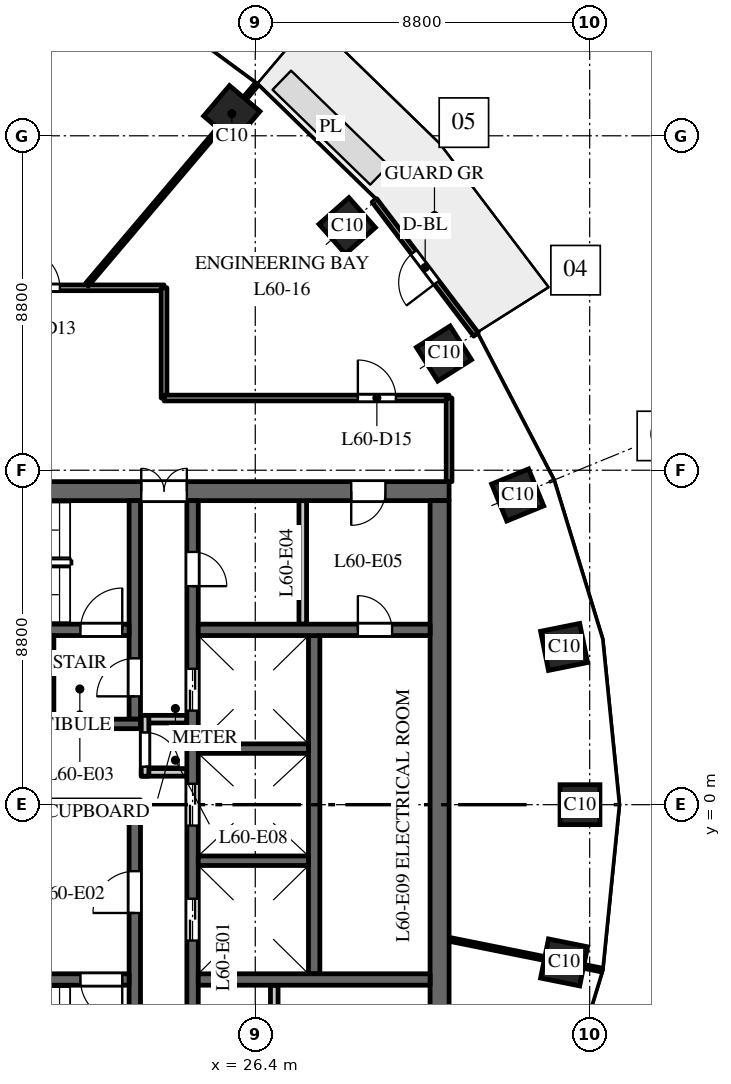
"""IFC4 building model, lengths in metres.
Left out: names, types, materials, properties, quantities, classifications, styles, units other than length and angle.
Written with IfcOpenShell. Run it as: python <this file> out.ifc"""

import sys

from ifc_helpers import new_model, si_unit, direction, frame, frame_2d, origin, origin_2d, place, context, subcontext, project, spatial, rectangle, extrude, element, fill, save


model = new_model("IFC4")
c1 = context("Model", 3, precision=1e-05, world=origin(), true_north=direction((0.0, 1.0)))
c2 = subcontext(c1, "Body", "Model", "MODEL_VIEW")
j1 = project(units=[si_unit("LENGTHUNIT", "METRE"), si_unit("PLANEANGLEUNIT", "RADIAN")], contexts=[c1])
p1 = place(None, origin())
s1 = spatial("IfcSite", under=j1, at=p1, CompositionType="ELEMENT")
p2 = place(p1, origin())
s2 = spatial("IfcBuilding", under=s1, at=p2, CompositionType="ELEMENT")
p3 = place(p2, frame((0.0, 0.0, 281.5)))
s3 = spatial("IfcBuildingStorey", under=s2, at=p3, CompositionType="ELEMENT", Elevation=281.5)
for number, where, z_axis, x_axis in (
    (1, (34.945, 0.0, 0.0), (0.0, 0.0, 1.0), (0.0, 1.0, 0.0)),
    (2, (34.527, 4.151, 0.0), (0.0, 0.0, 1.0), (-0.197, 0.98, 0.0)),
    (3, (33.305, 8.149, 0.0), (0.0, 0.0, 1.0), (-0.379, 0.925, 0.0)),
    (4, (31.365, 11.871, 0.0), (0.0, 0.0, 1.0), (-0.535, 0.845, 0.0)),
    (5, (28.819, 15.23, 0.0), (0.0, 0.0, 1.0), (-0.663, 0.749, 0.0)),
    (6, (25.783, 18.18, 0.0), (0.0, 0.0, 1.0), (-0.763, 0.646, 0.0)),
    (7, (34.527, -4.151, 0.0), (0.0, 0.0, 1.0), (0.197, 0.98, 0.0)),
):
    element("IfcColumn", number, at=place(p3, frame(where, z_axis=z_axis, x_axis=x_axis)), inside=s3, PredefinedType="COLUMN", context=c2, shape_type="SweptSolid", body=[
        extrude(rectangle(XDim=1.05, YDim=1.05, at=origin_2d()), origin(), (0.0, 0.0, 1.0), 4.0),
    ])
p4 = place(p3, frame((16.5, 8.25, 0.0), z_axis=(0.0, 0.0, 1.0), x_axis=(1.0, 0.0, 0.0)))
e8 = element("IfcWall", 8, at=p4, inside=s3, PredefinedType="SHEAR", context=c2, shape_type="SweptSolid", body=[
    extrude(rectangle(XDim=15.0, YDim=0.5, at=frame_2d((7.5, 0.0))), origin(), (0.0, 0.0, 1.0), 3.7),
])
p5 = place(p4, frame((6.9, 0.0, 0.0)))
e9 = element("IfcOpeningElement", 9, at=p5, cuts=e8, PredefinedType="OPENING", context=c2, shape_type="SweptSolid", body=[
    extrude(rectangle(XDim=1.2, YDim=2.1, at=frame_2d((0.6, 1.05))), frame((0.0, 0.26, 0.0), z_axis=(0.0, -1.0, 0.0), x_axis=(1.0, 0.0, 0.0)), (0.0, 0.0, 1.0), 0.52),
])
p6 = place(p4, frame((12.425, 0.0, 0.0)))
e10 = element("IfcOpeningElement", 10, at=p6, cuts=e8, PredefinedType="OPENING", context=c2, shape_type="SweptSolid", body=[
    extrude(rectangle(XDim=0.9, YDim=2.1, at=frame_2d((0.45, 1.05))), frame((0.0, 0.26, 0.0), z_axis=(0.0, -1.0, 0.0), x_axis=(1.0, 0.0, 0.0)), (0.0, 0.0, 1.0), 0.52),
])
p7 = place(p3, frame((27.95, -4.45, 0.0), z_axis=(0.0, 0.0, 1.0), x_axis=(0.0, 1.0, 0.0)))
e11 = element("IfcWall", 11, at=p7, inside=s3, PredefinedType="SHEAR", context=c2, shape_type="SweptSolid", body=[
    extrude(rectangle(XDim=8.9, YDim=0.3, at=frame_2d((4.45, 0.0))), origin(), (0.0, 0.0, 1.0), 3.7),
])
p8 = place(p3, frame((24.75, -8.0, 0.0), z_axis=(0.0, 0.0, 1.0), x_axis=(0.0, 1.0, 0.0)))
e12 = element("IfcWall", 12, at=p8, inside=s3, PredefinedType="SHEAR", context=c2, shape_type="SweptSolid", body=[
    extrude(rectangle(XDim=16.0, YDim=0.3, at=frame_2d((8.0, 0.0))), origin(), (0.0, 0.0, 1.0), 3.7),
])
p9 = place(p8, frame((4.425, 0.0, 0.0)))
e13 = element("IfcOpeningElement", 13, at=p9, cuts=e12, PredefinedType="OPENING", context=c2, shape_type="SweptSolid", body=[
    extrude(rectangle(XDim=1.1, YDim=2.1, at=frame_2d((0.55, 1.05))), frame((0.0, 0.16, 0.0), z_axis=(0.0, -1.0, 0.0), x_axis=(1.0, 0.0, 0.0)), (0.0, 0.0, 1.0), 0.32),
])
p10 = place(p8, frame((7.45, 0.0, 0.0)))
e14 = element("IfcOpeningElement", 14, at=p10, cuts=e12, PredefinedType="OPENING", context=c2, shape_type="SweptSolid", body=[
    extrude(rectangle(XDim=1.1, YDim=2.1, at=frame_2d((0.55, 1.05))), frame((0.0, 0.16, 0.0), z_axis=(0.0, -1.0, 0.0), x_axis=(1.0, 0.0, 0.0)), (0.0, 0.0, 1.0), 0.32),
])
p11 = place(p8, frame((10.475, 0.0, 0.0)))
e15 = element("IfcOpeningElement", 15, at=p11, cuts=e12, PredefinedType="OPENING", context=c2, shape_type="SweptSolid", body=[
    extrude(rectangle(XDim=1.1, YDim=2.1, at=frame_2d((0.55, 1.05))), frame((0.0, 0.16, 0.0), z_axis=(0.0, -1.0, 0.0), x_axis=(1.0, 0.0, 0.0)), (0.0, 0.0, 1.0), 0.32),
])
p12 = place(p8, frame((13.75, 0.0, 0.0)))
e16 = element("IfcOpeningElement", 16, at=p12, cuts=e12, PredefinedType="OPENING", context=c2, shape_type="SweptSolid", body=[
    extrude(rectangle(XDim=0.9, YDim=2.1, at=frame_2d((0.45, 1.05))), frame((0.0, 0.16, 0.0), z_axis=(0.0, -1.0, 0.0), x_axis=(1.0, 0.0, 0.0)), (0.0, 0.0, 1.0), 0.32),
])
p13 = place(p8, frame((1.35, 0.0, 0.0)))
e17 = element("IfcOpeningElement", 17, at=p13, cuts=e12, PredefinedType="OPENING", context=c2, shape_type="SweptSolid", body=[
    extrude(rectangle(XDim=0.9, YDim=2.1, at=frame_2d((0.45, 1.05))), frame((0.0, 0.16, 0.0), z_axis=(0.0, -1.0, 0.0), x_axis=(1.0, 0.0, 0.0)), (0.0, 0.0, 1.0), 0.32),
])
p14 = place(p3, frame((20.1, 0.0, 0.0), z_axis=(0.0, 0.0, 1.0), x_axis=(1.0, 0.0, 0.0)))
e18 = element("IfcWall", 18, at=p14, inside=s3, PredefinedType="SHEAR", context=c2, shape_type="SweptSolid", body=[
    extrude(rectangle(XDim=3.28, YDim=0.25, at=frame_2d((1.64, 0.0))), origin(), (0.0, 0.0, 1.0), 3.7),
])
for number, where, z_axis, x_axis in (
    (19, (23.4, 0.85, 0.0), (0.0, 0.0, 1.0), (1.0, 0.0, 0.0)),
    (20, (23.4, 2.25, 0.0), (0.0, 0.0, 1.0), (1.0, 0.0, 0.0)),
):
    element("IfcWall", number, at=place(p3, frame(where, z_axis=z_axis, x_axis=x_axis)), inside=s3, PredefinedType="PARTITIONING", context=c2, shape_type="SweptSolid", body=[
        extrude(rectangle(XDim=1.2, YDim=0.2, at=frame_2d((0.6, 0.0))), origin(), (0.0, 0.0, 1.0), 3.7),
    ])
p15 = place(p3, frame((23.5, 0.75, 0.0), z_axis=(0.0, 0.0, 1.0), x_axis=(0.0, 1.0, 0.0)))
e21 = element("IfcWall", 21, at=p15, inside=s3, PredefinedType="PARTITIONING", context=c2, shape_type="SweptSolid", body=[
    extrude(rectangle(XDim=1.6, YDim=0.2, at=frame_2d((0.8, 0.0))), origin(), (0.0, 0.0, 1.0), 3.7),
])
p16 = place(p15, frame((0.25, 0.0, 0.0)))
e22 = element("IfcOpeningElement", 22, at=p16, cuts=e21, PredefinedType="OPENING", context=c2, shape_type="SweptSolid", body=[
    extrude(rectangle(XDim=0.9, YDim=2.1, at=frame_2d((0.45, 1.05))), frame((0.0, 0.11, 0.0), z_axis=(0.0, -1.0, 0.0), x_axis=(1.0, 0.0, 0.0)), (0.0, 0.0, 1.0), 0.22),
])
p17 = place(p3, frame((31.25, -8.0, 0.0), z_axis=(0.0, 0.0, 1.0), x_axis=(0.0, 1.0, 0.0)))
e23 = element("IfcWall", 23, at=p17, inside=s3, PredefinedType="SHEAR", context=c2, shape_type="SweptSolid", body=[
    extrude(rectangle(XDim=16.0, YDim=0.5, at=frame_2d((8.0, 0.0))), origin(), (0.0, 0.0, 1.0), 3.7),
])
p18 = place(p3, frame((24.9, 4.6, 0.0), z_axis=(0.0, 0.0, 1.0), x_axis=(1.0, 0.0, 0.0)))
e24 = element("IfcWall", 24, at=p18, inside=s3, PredefinedType="SHEAR", context=c2, shape_type="SweptSolid", body=[
    extrude(rectangle(XDim=6.1, YDim=0.3, at=frame_2d((3.05, 0.0))), origin(), (0.0, 0.0, 1.0), 3.7),
])
p19 = place(p18, frame((4.2, 0.0, 0.0)))
e25 = element("IfcOpeningElement", 25, at=p19, cuts=e24, PredefinedType="OPENING", context=c2, shape_type="SweptSolid", body=[
    extrude(rectangle(XDim=0.9, YDim=2.1, at=frame_2d((0.45, 1.05))), frame((0.0, 0.16, 0.0), z_axis=(0.0, -1.0, 0.0), x_axis=(1.0, 0.0, 0.0)), (0.0, 0.0, 1.0), 0.32),
])
for number, where, z_axis, x_axis in (
    (26, (27.65, 4.75, 0.0), (0.0, 0.0, 1.0), (0.0, 1.0, 0.0)),
    (27, (26.9, -8.0, 0.0), (0.0, 0.0, 1.0), (0.0, 1.0, 0.0)),
):
    element("IfcWall", number, at=place(p3, frame(where, z_axis=z_axis, x_axis=x_axis)), inside=s3, PredefinedType="PARTITIONING", context=c2, shape_type="SweptSolid", body=[
        extrude(rectangle(XDim=3.25, YDim=0.2, at=frame_2d((1.625, 0.0))), origin(), (0.0, 0.0, 1.0), 3.7),
    ])
p20 = place(p3, frame((24.9, -4.6, 0.0), z_axis=(0.0, 0.0, 1.0), x_axis=(1.0, 0.0, 0.0)))
e28 = element("IfcWall", 28, at=p20, inside=s3, PredefinedType="SHEAR", context=c2, shape_type="SweptSolid", body=[
    extrude(rectangle(XDim=6.1, YDim=0.3, at=frame_2d((3.05, 0.0))), origin(), (0.0, 0.0, 1.0), 3.7),
])
for number, where, z_axis, x_axis in (
    (29, (24.9, -1.475, 0.0), (0.0, 0.0, 1.0), (1.0, 0.0, 0.0)),
    (30, (24.9, 1.475, 0.0), (0.0, 0.0, 1.0), (1.0, 0.0, 0.0)),
):
    element("IfcWall", number, at=place(p3, frame(where, z_axis=z_axis, x_axis=x_axis)), inside=s3, PredefinedType="SHEAR", context=c2, shape_type="SweptSolid", body=[
        extrude(rectangle(XDim=2.9, YDim=0.25, at=frame_2d((1.45, 0.0))), origin(), (0.0, 0.0, 1.0), 3.7),
    ])
p21 = place(p3, frame((23.23, 2.25, 0.0), z_axis=(0.0, 0.0, 1.0), x_axis=(0.0, 1.0, 0.0)))
e31 = element("IfcWall", 31, at=p21, inside=s3, PredefinedType="SHEAR", context=c2, shape_type="SweptSolid", body=[
    extrude(rectangle(XDim=5.75, YDim=0.3, at=frame_2d((2.875, 0.0))), origin(), (0.0, 0.0, 1.0), 3.7),
])
p22 = place(p21, frame((0.6, 0.0, 0.0)))
e32 = element("IfcOpeningElement", 32, at=p22, cuts=e31, PredefinedType="OPENING", context=c2, shape_type="SweptSolid", body=[
    extrude(rectangle(XDim=1.0, YDim=2.1, at=frame_2d((0.5, 1.05))), frame((0.0, 0.16, 0.0), z_axis=(0.0, -1.0, 0.0), x_axis=(1.0, 0.0, 0.0)), (0.0, 0.0, 1.0), 0.32),
])
p23 = place(p3, frame((23.23, -8.0, 0.0), z_axis=(0.0, 0.0, 1.0), x_axis=(0.0, 1.0, 0.0)))
e33 = element("IfcWall", 33, at=p23, inside=s3, PredefinedType="SHEAR", context=c2, shape_type="SweptSolid", body=[
    extrude(rectangle(XDim=7.875, YDim=0.3, at=frame_2d((3.938, 0.0))), origin(), (0.0, 0.0, 1.0), 3.7),
])
p24 = place(p23, frame((5.15, 0.0, 0.0)))
e34 = element("IfcOpeningElement", 34, at=p24, cuts=e33, PredefinedType="OPENING", context=c2, shape_type="SweptSolid", body=[
    extrude(rectangle(XDim=1.1, YDim=2.1, at=frame_2d((0.55, 1.05))), frame((0.0, 0.16, 0.0), z_axis=(0.0, -1.0, 0.0), x_axis=(1.0, 0.0, 0.0)), (0.0, 0.0, 1.0), 0.32),
])
p25 = place(p3, frame((16.9, 4.6, 0.0), z_axis=(0.0, 0.0, 1.0), x_axis=(1.0, 0.0, 0.0)))
e35 = element("IfcWall", 35, at=p25, inside=s3, PredefinedType="SHEAR", context=c2, shape_type="SweptSolid", body=[
    extrude(rectangle(XDim=6.18, YDim=0.3, at=frame_2d((3.09, 0.0))), origin(), (0.0, 0.0, 1.0), 3.7),
])
p26 = place(p25, frame((4.9, 0.0, 0.0)))
e36 = element("IfcOpeningElement", 36, at=p26, cuts=e35, PredefinedType="OPENING", context=c2, shape_type="SweptSolid", body=[
    extrude(rectangle(XDim=1.1, YDim=2.1, at=frame_2d((0.55, 1.05))), frame((0.0, 0.16, 0.0), z_axis=(0.0, -1.0, 0.0), x_axis=(1.0, 0.0, 0.0)), (0.0, 0.0, 1.0), 0.32),
])
p27 = place(p3, frame((16.9, -4.6, 0.0), z_axis=(0.0, 0.0, 1.0), x_axis=(1.0, 0.0, 0.0)))
e37 = element("IfcWall", 37, at=p27, inside=s3, PredefinedType="SHEAR", context=c2, shape_type="SweptSolid", body=[
    extrude(rectangle(XDim=6.18, YDim=0.3, at=frame_2d((3.09, 0.0))), origin(), (0.0, 0.0, 1.0), 3.7),
])
p28 = place(p27, frame((4.9, 0.0, 0.0)))
e38 = element("IfcOpeningElement", 38, at=p28, cuts=e37, PredefinedType="OPENING", context=c2, shape_type="SweptSolid", body=[
    extrude(rectangle(XDim=1.1, YDim=2.1, at=frame_2d((0.55, 1.05))), frame((0.0, 0.16, 0.0), z_axis=(0.0, -1.0, 0.0), x_axis=(1.0, 0.0, 0.0)), (0.0, 0.0, 1.0), 0.32),
])
p29 = place(p3, frame((20.85, 2.125, 0.0), z_axis=(0.0, 0.0, 1.0), x_axis=(1.0, 0.0, 0.0)))
e39 = element("IfcWall", 39, at=p29, inside=s3, PredefinedType="SHEAR", context=c2, shape_type="SweptSolid", body=[
    extrude(rectangle(XDim=2.53, YDim=0.25, at=frame_2d((1.265, 0.0))), origin(), (0.0, 0.0, 1.0), 3.7),
])
p30 = place(p3, frame((20.975, 2.25, 0.0), z_axis=(0.0, 0.0, 1.0), x_axis=(0.0, 1.0, 0.0)))
e40 = element("IfcWall", 40, at=p30, inside=s3, PredefinedType="SHEAR", context=c2, shape_type="SweptSolid", body=[
    extrude(rectangle(XDim=2.2, YDim=0.25, at=frame_2d((1.1, 0.0))), origin(), (0.0, 0.0, 1.0), 3.7),
])
p31 = place(p3, frame((32.208, 12.374, 0.0), z_axis=(0.0, 0.0, 1.0), x_axis=(-0.604045763106, 0.796949632081, 0.0)))
e41 = element("IfcWall", 41, at=p31, inside=s3, PredefinedType="STANDARD", context=c2, shape_type="SweptSolid", body=[
    extrude(rectangle(XDim=4.423, YDim=0.15, at=frame_2d((2.212, 0.0))), origin(), (0.0, 0.0, 1.0), 3.7),
])
p32 = place(p31, frame((1.712, 0.0, 0.0)))
e42 = element("IfcOpeningElement", 42, at=p32, cuts=e41, PredefinedType="OPENING", context=c2, shape_type="SweptSolid", body=[
    extrude(rectangle(XDim=1.0, YDim=2.4, at=frame_2d((0.5, 1.2))), frame((0.0, 0.085, 0.0), z_axis=(0.0, -1.0, 0.0), x_axis=(1.0, 0.0, 0.0)), (0.0, 0.0, 1.0), 0.17),
])
p33 = place(p3, frame((4.566, 13.6, 0.0), z_axis=(0.0, 0.0, 1.0), x_axis=(1.0, 0.0, 0.0)))
e43 = element("IfcWall", 43, at=p33, inside=s3, PredefinedType="PARTITIONING", context=c2, shape_type="SweptSolid", body=[
    extrude(rectangle(XDim=19.434, YDim=0.15, at=frame_2d((9.717, 0.0))), origin(), (0.0, 0.0, 1.0), 2.85),
])
p34 = place(p33, frame((15.692, 0.0, 0.0)))
e44 = element("IfcOpeningElement", 44, at=p34, cuts=e43, PredefinedType="OPENING", context=c2, shape_type="SweptSolid", body=[
    extrude(rectangle(XDim=1.0, YDim=2.1, at=frame_2d((0.5, 1.05))), frame((0.0, 0.085, 0.0), z_axis=(0.0, -1.0, 0.0), x_axis=(1.0, 0.0, 0.0)), (0.0, 0.0, 1.0), 0.17),
])
p35 = place(p3, frame((21.968, 13.678, 0.0), z_axis=(0.0, 0.0, 1.0), x_axis=(0.646376547424, 0.763018583614, 0.0)))
e45 = element("IfcWall", 45, at=p35, inside=s3, PredefinedType="PARTITIONING", context=c2, shape_type="SweptSolid", body=[
    extrude(rectangle(XDim=6.903, YDim=0.1, at=frame_2d((3.452, 0.0))), origin(), (0.0, 0.0, 1.0), 3.0),
])
p36 = place(p3, frame((24.0, 10.7, 0.0), z_axis=(0.0, 0.0, 1.0), x_axis=(0.0, 1.0, 0.0)))
e46 = element("IfcWall", 46, at=p36, inside=s3, PredefinedType="PARTITIONING", context=c2, shape_type="SweptSolid", body=[
    extrude(rectangle(XDim=2.9, YDim=0.15, at=frame_2d((1.45, 0.0))), origin(), (0.0, 0.0, 1.0), 2.75),
])
p37 = place(p3, frame((24.0, 10.7, 0.0), z_axis=(0.0, 0.0, 1.0), x_axis=(1.0, 0.0, 0.0)))
e47 = element("IfcWall", 47, at=p37, inside=s3, PredefinedType="PARTITIONING", context=c2, shape_type="SweptSolid", body=[
    extrude(rectangle(XDim=7.5, YDim=0.15, at=frame_2d((3.75, 0.0))), origin(), (0.0, 0.0, 1.0), 3.0),
])
p38 = place(p37, frame((5.1, 0.0, 0.0)))
e48 = element("IfcOpeningElement", 48, at=p38, cuts=e47, PredefinedType="OPENING", context=c2, shape_type="SweptSolid", body=[
    extrude(rectangle(XDim=1.0, YDim=2.1, at=frame_2d((0.5, 1.05))), frame((0.0, 0.085, 0.0), z_axis=(0.0, -1.0, 0.0), x_axis=(1.0, 0.0, 0.0)), (0.0, 0.0, 1.0), 0.17),
])
p39 = place(p3, frame((31.5, -3.542, 0.0), z_axis=(0.0, 0.0, 1.0), x_axis=(0.980357474535, -0.197228857227, 0.0)))
e49 = element("IfcWall", 49, at=p39, inside=s3, PredefinedType="PARTITIONING", context=c2, shape_type="SweptSolid", body=[
    extrude(rectangle(XDim=4.092, YDim=0.1, at=frame_2d((2.046, 0.0))), origin(), (0.0, 0.0, 1.0), 3.0),
])
p40 = place(p3, frame((31.5, 8.5, 0.0), z_axis=(0.0, 0.0, 1.0), x_axis=(0.0, 1.0, 0.0)))
e50 = element("IfcWall", 50, at=p40, inside=s3, PredefinedType="PARTITIONING", context=c2, shape_type="SweptSolid", body=[
    extrude(rectangle(XDim=2.2, YDim=0.15, at=frame_2d((1.1, 0.0))), origin(), (0.0, 0.0, 1.0), 3.0),
])
p41 = place(p9, origin())
e51 = element("IfcDoor", 51, at=p41, inside=s3, OperationType="DOUBLE_DOOR_SLIDING", PredefinedType="DOOR", context=c2, shape_type="SweptSolid", body=[
    extrude(rectangle(XDim=1.1, YDim=2.1, at=frame_2d((0.55, 1.05))), frame((0.0, 0.025, 0.0), z_axis=(0.0, -1.0, 0.0), x_axis=(1.0, 0.0, 0.0)), (0.0, 0.0, 1.0), 0.05),
])
fill(e13, e51)
p42 = place(p10, origin())
e52 = element("IfcDoor", 52, at=p42, inside=s3, OperationType="DOUBLE_DOOR_SLIDING", PredefinedType="DOOR", context=c2, shape_type="SweptSolid", body=[
    extrude(rectangle(XDim=1.1, YDim=2.1, at=frame_2d((0.55, 1.05))), frame((0.0, 0.025, 0.0), z_axis=(0.0, -1.0, 0.0), x_axis=(1.0, 0.0, 0.0)), (0.0, 0.0, 1.0), 0.05),
])
fill(e14, e52)
p43 = place(p11, origin())
e53 = element("IfcDoor", 53, at=p43, inside=s3, OperationType="DOUBLE_DOOR_SLIDING", PredefinedType="DOOR", context=c2, shape_type="SweptSolid", body=[
    extrude(rectangle(XDim=1.1, YDim=2.1, at=frame_2d((0.55, 1.05))), frame((0.0, 0.025, 0.0), z_axis=(0.0, -1.0, 0.0), x_axis=(1.0, 0.0, 0.0)), (0.0, 0.0, 1.0), 0.05),
])
fill(e15, e53)
p44 = place(p26, origin())
e54 = element("IfcDoor", 54, at=p44, inside=s3, OperationType="SINGLE_SWING_LEFT", PredefinedType="DOOR", context=c2, shape_type="SweptSolid", body=[
    extrude(rectangle(XDim=1.1, YDim=2.1, at=frame_2d((0.55, 1.05))), frame((0.0, 0.025, 0.0), z_axis=(0.0, -1.0, 0.0), x_axis=(1.0, 0.0, 0.0)), (0.0, 0.0, 1.0), 0.05),
])
fill(e36, e54)
p45 = place(p28, origin())
e55 = element("IfcDoor", 55, at=p45, inside=s3, OperationType="SINGLE_SWING_RIGHT", PredefinedType="DOOR", context=c2, shape_type="SweptSolid", body=[
    extrude(rectangle(XDim=1.1, YDim=2.1, at=frame_2d((0.55, 1.05))), frame((0.0, 0.025, 0.0), z_axis=(0.0, -1.0, 0.0), x_axis=(1.0, 0.0, 0.0)), (0.0, 0.0, 1.0), 0.05),
])
fill(e38, e55)
p46 = place(p24, origin())
e56 = element("IfcDoor", 56, at=p46, inside=s3, OperationType="SINGLE_SWING_RIGHT", PredefinedType="DOOR", context=c2, shape_type="SweptSolid", body=[
    extrude(rectangle(XDim=1.1, YDim=2.1, at=frame_2d((0.55, 1.05))), frame((0.0, 0.025, 0.0), z_axis=(0.0, -1.0, 0.0), x_axis=(1.0, 0.0, 0.0)), (0.0, 0.0, 1.0), 0.05),
])
fill(e34, e56)
p47 = place(p22, origin())
e57 = element("IfcDoor", 57, at=p47, inside=s3, OperationType="SINGLE_SWING_RIGHT", PredefinedType="DOOR", context=c2, shape_type="SweptSolid", body=[
    extrude(rectangle(XDim=1.0, YDim=2.1, at=frame_2d((0.5, 1.05))), frame((0.0, 0.025, 0.0), z_axis=(0.0, -1.0, 0.0), x_axis=(1.0, 0.0, 0.0)), (0.0, 0.0, 1.0), 0.05),
])
fill(e32, e57)
p48 = place(p5, origin())
e58 = element("IfcDoor", 58, at=p48, inside=s3, OperationType="DOUBLE_DOOR_DOUBLE_SWING", PredefinedType="DOOR", context=c2, shape_type="SweptSolid", body=[
    extrude(rectangle(XDim=1.2, YDim=2.1, at=frame_2d((0.6, 1.05))), frame((0.0, 0.025, 0.0), z_axis=(0.0, -1.0, 0.0), x_axis=(1.0, 0.0, 0.0)), (0.0, 0.0, 1.0), 0.05),
])
fill(e9, e58)
p49 = place(p12, origin())
e59 = element("IfcDoor", 59, at=p49, inside=s3, OperationType="SINGLE_SWING_LEFT", PredefinedType="DOOR", context=c2, shape_type="SweptSolid", body=[
    extrude(rectangle(XDim=0.9, YDim=2.1, at=frame_2d((0.45, 1.05))), frame((0.0, 0.025, 0.0), z_axis=(0.0, -1.0, 0.0), x_axis=(1.0, 0.0, 0.0)), (0.0, 0.0, 1.0), 0.05),
])
fill(e16, e59)
p50 = place(p6, origin())
e60 = element("IfcDoor", 60, at=p50, inside=s3, OperationType="SINGLE_SWING_LEFT", PredefinedType="DOOR", context=c2, shape_type="SweptSolid", body=[
    extrude(rectangle(XDim=0.9, YDim=2.1, at=frame_2d((0.45, 1.05))), frame((0.0, 0.025, 0.0), z_axis=(0.0, -1.0, 0.0), x_axis=(1.0, 0.0, 0.0)), (0.0, 0.0, 1.0), 0.05),
])
fill(e10, e60)
p51 = place(p16, origin())
e61 = element("IfcDoor", 61, at=p51, inside=s3, OperationType="SINGLE_SWING_LEFT", PredefinedType="DOOR", context=c2, shape_type="SweptSolid", body=[
    extrude(rectangle(XDim=0.9, YDim=2.1, at=frame_2d((0.45, 1.05))), frame((0.0, 0.025, 0.0), z_axis=(0.0, -1.0, 0.0), x_axis=(1.0, 0.0, 0.0)), (0.0, 0.0, 1.0), 0.05),
])
fill(e22, e61)
p52 = place(p19, origin())
e62 = element("IfcDoor", 62, at=p52, inside=s3, OperationType="SINGLE_SWING_RIGHT", PredefinedType="DOOR", context=c2, shape_type="SweptSolid", body=[
    extrude(rectangle(XDim=0.9, YDim=2.1, at=frame_2d((0.45, 1.05))), frame((0.0, 0.025, 0.0), z_axis=(0.0, -1.0, 0.0), x_axis=(1.0, 0.0, 0.0)), (0.0, 0.0, 1.0), 0.05),
])
fill(e25, e62)
p53 = place(p32, origin())
e63 = element("IfcDoor", 63, at=p53, inside=s3, OperationType="SINGLE_SWING_LEFT", PredefinedType="DOOR", context=c2, shape_type="SweptSolid", body=[
    extrude(rectangle(XDim=1.0, YDim=2.4, at=frame_2d((0.5, 1.2))), frame((0.0, 0.025, 0.0), z_axis=(0.0, -1.0, 0.0), x_axis=(1.0, 0.0, 0.0)), (0.0, 0.0, 1.0), 0.05),
])
fill(e42, e63)
p54 = place(p34, origin())
e64 = element("IfcDoor", 64, at=p54, inside=s3, OperationType="SINGLE_SWING_LEFT", PredefinedType="DOOR", context=c2, shape_type="SweptSolid", body=[
    extrude(rectangle(XDim=1.0, YDim=2.1, at=frame_2d((0.5, 1.05))), frame((0.0, 0.025, 0.0), z_axis=(0.0, -1.0, 0.0), x_axis=(1.0, 0.0, 0.0)), (0.0, 0.0, 1.0), 0.05),
])
fill(e44, e64)
p55 = place(p38, origin())
e65 = element("IfcDoor", 65, at=p55, inside=s3, OperationType="SINGLE_SWING_LEFT", PredefinedType="DOOR", context=c2, shape_type="SweptSolid", body=[
    extrude(rectangle(XDim=1.0, YDim=2.1, at=frame_2d((0.5, 1.05))), frame((0.0, 0.025, 0.0), z_axis=(0.0, -1.0, 0.0), x_axis=(1.0, 0.0, 0.0)), (0.0, 0.0, 1.0), 0.05),
])
fill(e48, e65)
save(model, sys.argv[1])
